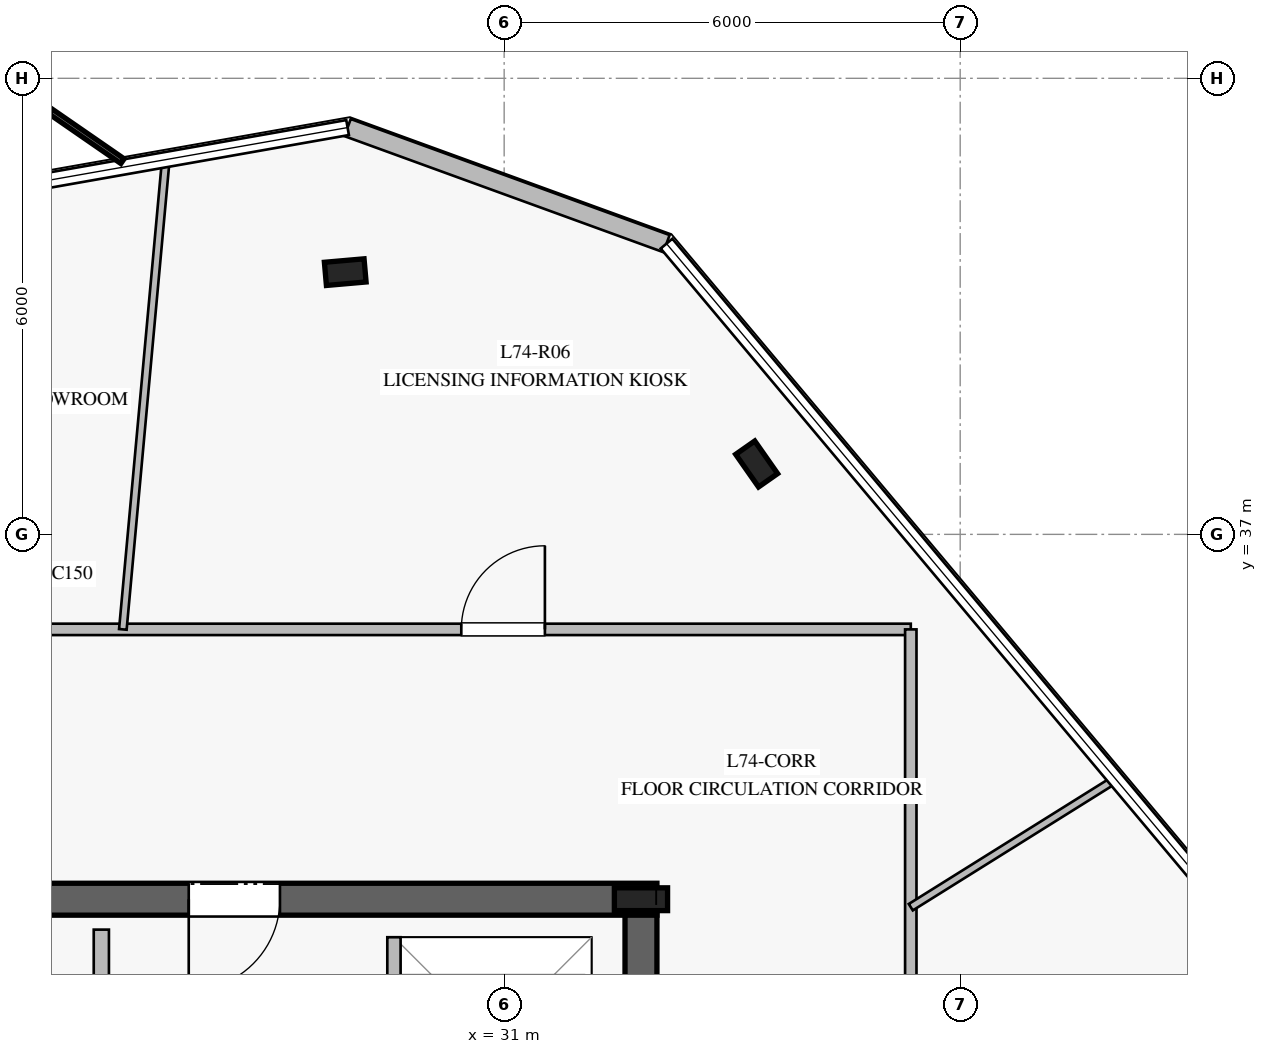
"""IFC4 building model, lengths in metres.
Left out: names, types, materials, properties, quantities, classifications, styles, units other than length and angle.
Written with IfcOpenShell. Run it as: python <this file> out.ifc"""

import sys

from ifc_helpers import new_model, si_unit, direction, frame, frame_2d, origin, origin_2d, place, context, subcontext, project, spatial, rectangle, i_section, extrude, element, fill, save


model = new_model("IFC4")
c1 = context("Model", 3, precision=1e-05, world=origin(), true_north=direction((0.0, 1.0)))
c2 = subcontext(c1, "Body", "Model", "MODEL_VIEW")
j1 = project(units=[si_unit("LENGTHUNIT", "METRE"), si_unit("PLANEANGLEUNIT", "RADIAN")], contexts=[c1])
p1 = place(None, origin())
s1 = spatial("IfcSite", under=j1, at=p1, CompositionType="ELEMENT")
p2 = place(p1, origin())
s2 = spatial("IfcBuilding", under=s1, at=p2, CompositionType="ELEMENT")
p3 = place(p2, frame((0.0, 0.0, 306.2)))
s3 = spatial("IfcBuildingStorey", under=s2, at=p3, CompositionType="ELEMENT", Elevation=306.2)
p4 = place(p3, frame((33.01, 32.2, 0.0), z_axis=(0.0, 0.0, 1.0), x_axis=(-1.0, 0.0, 0.0)))
e1 = element("IfcWall", 1, at=p4, inside=s3, PredefinedType="SHEAR", context=c2, shape_type="SweptSolid", body=[
    extrude(rectangle(XDim=16.02, YDim=0.42, at=frame_2d((8.01, 0.0))), origin(), (0.0, 0.0, 1.0), 3.78),
])
p5 = place(p4, frame((4.96, 0.0, 0.0)))
e2 = element("IfcOpeningElement", 2, at=p5, cuts=e1, PredefinedType="OPENING", context=c2, shape_type="SweptSolid", body=[
    extrude(rectangle(XDim=1.2, YDim=2.25, at=frame_2d((0.6, 1.125))), frame((0.0, 0.22, 0.0), z_axis=(0.0, -1.0, 0.0), x_axis=(1.0, 0.0, 0.0)), (0.0, 0.0, 1.0), 0.44),
])
p6 = place(p4, frame((9.785, 0.0, 0.0)))
e3 = element("IfcOpeningElement", 3, at=p6, cuts=e1, PredefinedType="OPENING", context=c2, shape_type="SweptSolid", body=[
    extrude(rectangle(XDim=1.1, YDim=2.2, at=frame_2d((0.55, 1.1))), frame((0.0, 0.22, 0.0), z_axis=(0.0, -1.0, 0.0), x_axis=(1.0, 0.0, 0.0)), (0.0, 0.0, 1.0), 0.44),
])
p7 = place(p3, frame((32.8, 18.01, 0.0), z_axis=(0.0, 0.0, 1.0), x_axis=(0.0, 1.0, 0.0)))
e4 = element("IfcWall", 4, at=p7, inside=s3, PredefinedType="SHEAR", context=c2, shape_type="SweptSolid", body=[
    extrude(rectangle(XDim=13.98, YDim=0.42, at=frame_2d((6.99, 0.0))), origin(), (0.0, 0.0, 1.0), 3.78),
])
p8 = place(p3, frame((32.8, 32.2, 0.0), z_axis=(0.0, 0.0, 1.0), x_axis=(1.0, 0.0, 0.0)))
e5 = element("IfcColumn", 5, at=p8, inside=s3, PredefinedType="COLUMN", context=c2, shape_type="SweptSolid", body=[
    extrude(i_section(OverallWidth=0.3, OverallDepth=0.7, WebThickness=0.017, FlangeThickness=0.032, at=origin_2d()), origin(), (0.0, 0.0, 1.0), 4.0),
])
for number, where, z_axis, x_axis in (
    (6, (28.909, 40.45, 0.0), (0.0, 0.0, 1.0), (0.996, 0.087, 0.0)),
    (7, (34.322, 37.926, 0.0), (0.0, 0.0, 1.0), (-0.574, 0.819, 0.0)),
):
    element("IfcColumn", number, at=place(p3, frame(where, z_axis=z_axis, x_axis=x_axis)), inside=s3, PredefinedType="COLUMN", context=c2, shape_type="SweptSolid", body=[
        extrude(i_section(OverallWidth=0.306, OverallDepth=0.524, WebThickness=0.021, FlangeThickness=0.04, at=origin_2d()), origin(), (0.0, 0.0, 1.0), 4.0),
    ])
p9 = place(p3, frame((33.136, 40.825, 0.0), z_axis=(0.0, 0.0, 1.0), x_axis=(-0.939702397898, 0.341993279738, 0.0)))
e8 = element("IfcWall", 8, at=p9, inside=s3, PredefinedType="STANDARD", context=c2, shape_type="SweptSolid", body=[
    extrude(rectangle(XDim=4.465, YDim=0.24, at=frame_2d((2.233, 0.0))), origin(), (0.0, 0.0, 1.0), 3.78),
])
p10 = place(p3, frame((25.7, 26.65, 0.0), z_axis=(0.0, 0.0, 1.0), x_axis=(0.0, 1.0, 0.0)))
e9 = element("IfcWall", 9, at=p10, inside=s3, PredefinedType="PARTITIONING", context=c2, shape_type="SweptSolid", body=[
    extrude(rectangle(XDim=5.15, YDim=0.2, at=frame_2d((2.575, 0.0))), origin(), (0.0, 0.0, 1.0), 3.78),
])
p11 = place(p3, frame((29.55, 29.1, 0.0), z_axis=(0.0, 0.0, 1.0), x_axis=(0.0, 1.0, 0.0)))
e10 = element("IfcWall", 10, at=p11, inside=s3, PredefinedType="PARTITIONING", context=c2, shape_type="SweptSolid", body=[
    extrude(rectangle(XDim=2.6, YDim=0.175, at=frame_2d((1.3, 0.0))), origin(), (0.0, 0.0, 1.0), 3.78),
])
p12 = place(p11, frame((0.7, 0.0, 0.0)))
e11 = element("IfcOpeningElement", 11, at=p12, cuts=e10, PredefinedType="OPENING", context=c2, shape_type="SweptSolid", body=[
    extrude(rectangle(XDim=1.2, YDim=2.2, at=frame_2d((0.6, 1.1))), frame((0.0, 0.098, 0.0), z_axis=(0.0, -1.0, 0.0), x_axis=(1.0, 0.0, 0.0)), (0.0, 0.0, 1.0), 0.195),
])
p13 = place(p3, frame((13.65, 35.75, 0.0), z_axis=(0.0, 0.0, 1.0), x_axis=(1.0, 0.0, 0.0)))
e12 = element("IfcWall", 12, at=p13, inside=s3, PredefinedType="PARTITIONING", context=c2, shape_type="SweptSolid", body=[
    extrude(rectangle(XDim=22.7, YDim=0.15, at=frame_2d((11.35, 0.0))), origin(), (0.0, 0.0, 1.0), 3.28),
])
p14 = place(p13, frame((7.718, 0.0, 0.0)))
e13 = element("IfcOpeningElement", 13, at=p14, cuts=e12, PredefinedType="OPENING", context=c2, shape_type="SweptSolid", body=[
    extrude(rectangle(XDim=1.1, YDim=2.2, at=frame_2d((0.55, 1.1))), frame((0.0, 0.085, 0.0), z_axis=(0.0, -1.0, 0.0), x_axis=(1.0, 0.0, 0.0)), (0.0, 0.0, 1.0), 0.17),
])
p15 = place(p13, frame((16.786, 0.0, 0.0)))
e14 = element("IfcOpeningElement", 14, at=p15, cuts=e12, PredefinedType="OPENING", context=c2, shape_type="SweptSolid", body=[
    extrude(rectangle(XDim=1.1, YDim=2.2, at=frame_2d((0.55, 1.1))), frame((0.0, 0.085, 0.0), z_axis=(0.0, -1.0, 0.0), x_axis=(1.0, 0.0, 0.0)), (0.0, 0.0, 1.0), 0.17),
])
p16 = place(p13, frame((1.906, 0.0, 0.0)))
e15 = element("IfcOpeningElement", 15, at=p16, cuts=e12, PredefinedType="OPENING", context=c2, shape_type="SweptSolid", body=[
    extrude(rectangle(XDim=1.1, YDim=2.2, at=frame_2d((0.55, 1.1))), frame((0.0, 0.085, 0.0), z_axis=(0.0, -1.0, 0.0), x_axis=(1.0, 0.0, 0.0)), (0.0, 0.0, 1.0), 0.17),
])
p17 = place(p3, frame((36.35, 35.75, 0.0), z_axis=(0.0, 0.0, 1.0), x_axis=(0.0, -1.0, 0.0)))
e16 = element("IfcWall", 16, at=p17, inside=s3, PredefinedType="PARTITIONING", context=c2, shape_type="SweptSolid", body=[
    extrude(rectangle(XDim=21.5, YDim=0.15, at=frame_2d((10.75, 0.0))), origin(), (0.0, 0.0, 1.0), 3.25),
])
p18 = place(p17, frame((18.515, 0.0, 0.0)))
e17 = element("IfcOpeningElement", 17, at=p18, cuts=e16, PredefinedType="OPENING", context=c2, shape_type="SweptSolid", body=[
    extrude(rectangle(XDim=1.1, YDim=2.2, at=frame_2d((0.55, 1.1))), frame((0.0, 0.085, 0.0), z_axis=(0.0, -1.0, 0.0), x_axis=(1.0, 0.0, 0.0)), (0.0, 0.0, 1.0), 0.17),
])
p19 = place(p17, frame((9.663, 0.0, 0.0)))
e18 = element("IfcOpeningElement", 18, at=p19, cuts=e16, PredefinedType="OPENING", context=c2, shape_type="SweptSolid", body=[
    extrude(rectangle(XDim=1.1, YDim=2.2, at=frame_2d((0.55, 1.1))), frame((0.0, 0.085, 0.0), z_axis=(0.0, -1.0, 0.0), x_axis=(1.0, 0.0, 0.0)), (0.0, 0.0, 1.0), 0.17),
])
p20 = place(p3, frame((36.35, 32.095, 0.0), z_axis=(0.0, 0.0, 1.0), x_axis=(0.847967956765, 0.530047492494, 0.0)))
e19 = element("IfcWall", 19, at=p20, inside=s3, PredefinedType="MOVABLE", context=c2, shape_type="SweptSolid", body=[
    extrude(rectangle(XDim=3.164, YDim=0.1, at=frame_2d((1.582, 0.0))), origin(), (0.0, 0.0, 1.0), 3.28),
])
p21 = place(p3, frame((25.983, 35.75, 0.0), z_axis=(0.0, 0.0, 1.0), x_axis=(0.091150962687, 0.995837086074, 0.0)))
e20 = element("IfcWall", 20, at=p21, inside=s3, PredefinedType="MOVABLE", context=c2, shape_type="SweptSolid", body=[
    extrude(rectangle(XDim=6.19, YDim=0.1, at=frame_2d((3.095, 0.0))), origin(), (0.0, 0.0, 1.0), 3.28),
])
p22 = place(p5, origin())
e21 = element("IfcDoor", 21, at=p22, inside=s3, OperationType="SINGLE_SWING_RIGHT", PredefinedType="DOOR", context=c2, shape_type="SweptSolid", body=[
    extrude(rectangle(XDim=1.2, YDim=2.25, at=frame_2d((0.6, 1.125))), frame((0.0, 0.025, 0.0), z_axis=(0.0, -1.0, 0.0), x_axis=(1.0, 0.0, 0.0)), (0.0, 0.0, 1.0), 0.05),
])
fill(e2, e21)
p23 = place(p15, origin())
e22 = element("IfcDoor", 22, at=p23, inside=s3, OperationType="SINGLE_SWING_RIGHT", PredefinedType="DOOR", context=c2, shape_type="SweptSolid", body=[
    extrude(rectangle(XDim=1.1, YDim=2.2, at=frame_2d((0.55, 1.1))), frame((0.0, 0.025, 0.0), z_axis=(0.0, -1.0, 0.0), x_axis=(1.0, 0.0, 0.0)), (0.0, 0.0, 1.0), 0.05),
])
fill(e14, e22)
save(model, sys.argv[1])
